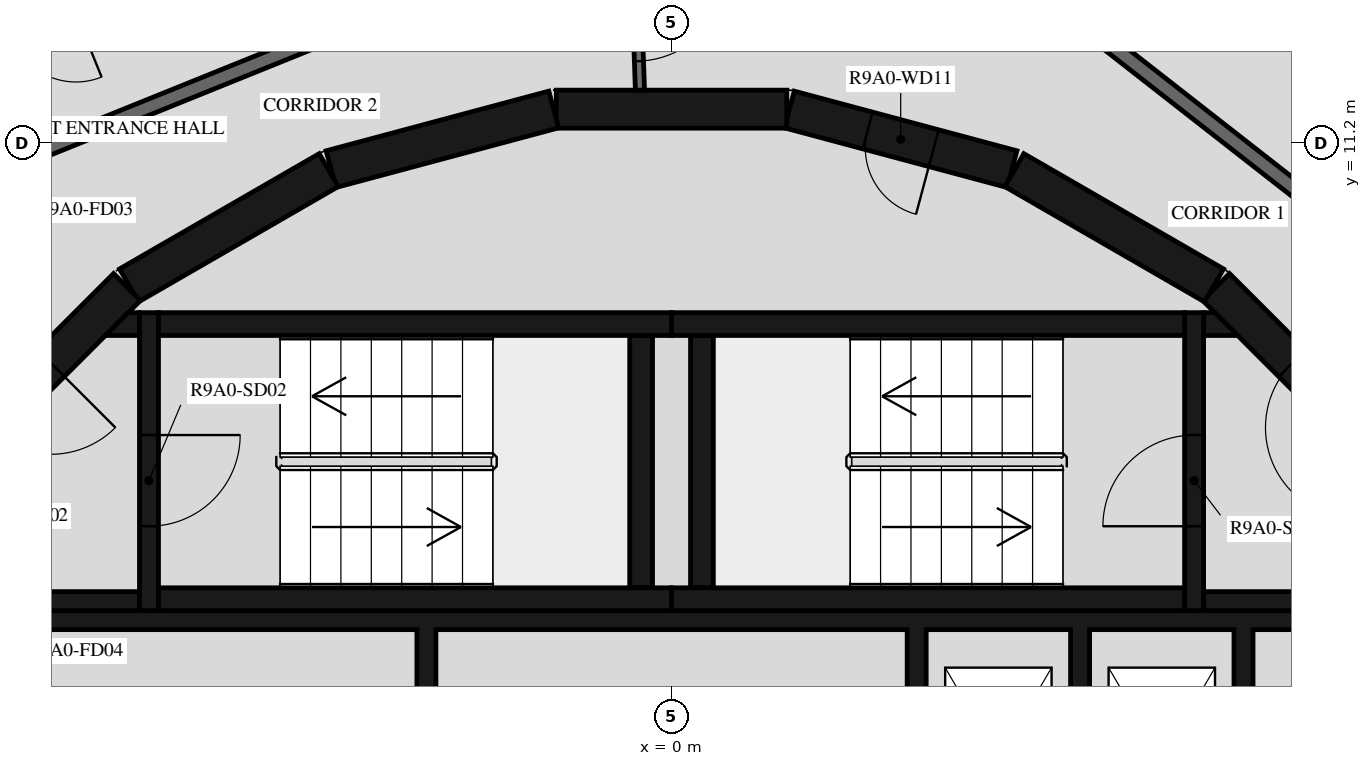
"""IFC4 building model, lengths in metres.
Left out: names, types, materials, properties, quantities, classifications, styles, units other than length and angle.
Written with IfcOpenShell. Run it as: python <this file> out.ifc"""

import sys

from ifc_helpers import new_model, si_unit, direction, frame, frame_2d, origin, place, context, subcontext, project, spatial, polyline, rectangle, outline, extrude, element, fill, save


model = new_model("IFC4")
c1 = context("Model", 3, precision=1e-05, world=origin(), true_north=direction((0.0, 1.0)))
c2 = subcontext(c1, "Body", "Model", "MODEL_VIEW")
j1 = project(units=[si_unit("LENGTHUNIT", "METRE"), si_unit("PLANEANGLEUNIT", "RADIAN")], contexts=[c1])
p1 = place(None, origin())
s1 = spatial("IfcSite", under=j1, at=p1, CompositionType="ELEMENT")
p2 = place(p1, origin())
s2 = spatial("IfcBuilding", under=s1, at=p2, CompositionType="ELEMENT")
p3 = place(p2, frame((0.0, 0.0, 333.0)))
s3 = spatial("IfcBuildingStorey", under=s2, at=p3, CompositionType="ELEMENT", Elevation=333.0)
p4 = place(p3, frame((9.308, 7.164, 0.0), z_axis=(0.0, 0.0, 1.0), x_axis=(-0.707106781187, 0.707106781187, 0.0)))
e1 = element("IfcWall", 1, at=p4, inside=s3, PredefinedType="SHEAR", context=c2, shape_type="SweptSolid", body=[
    extrude(rectangle(XDim=3.032, YDim=0.5, at=frame_2d((1.516, 0.0))), origin(), (0.0, 0.0, 1.0), 3.12),
])
p5 = place(p4, frame((0.416, 0.0, 0.0)))
e2 = element("IfcOpeningElement", 2, at=p5, cuts=e1, PredefinedType="OPENING", context=c2, shape_type="SweptSolid", body=[
    extrude(rectangle(XDim=1.2, YDim=2.1, at=frame_2d((0.6, 1.05))), frame((0.0, 0.26, 0.0), z_axis=(0.0, -1.0, 0.0), x_axis=(1.0, 0.0, 0.0)), (0.0, 0.0, 1.0), 0.52),
])
p6 = place(p3, frame((7.137, 9.329, 0.0), z_axis=(0.0, 0.0, 1.0), x_axis=(-0.865975092491, 0.500087131594, 0.0)))
e3 = element("IfcWall", 3, at=p6, inside=s3, PredefinedType="SHEAR", context=c2, shape_type="SweptSolid", body=[
    extrude(rectangle(XDim=3.033, YDim=0.5, at=frame_2d((1.516, 0.0))), origin(), (0.0, 0.0, 1.0), 3.12),
])
p7 = place(p3, frame((4.479, 10.858, 0.0), z_axis=(0.0, 0.0, 1.0), x_axis=(-0.965948410781, 0.258734743916, 0.0)))
e4 = element("IfcWall", 4, at=p7, inside=s3, PredefinedType="SHEAR", context=c2, shape_type="SweptSolid", body=[
    extrude(rectangle(XDim=3.033, YDim=0.5, at=frame_2d((1.516, 0.0))), origin(), (0.0, 0.0, 1.0), 3.12),
])
p8 = place(p7, frame((1.066, 0.0, 0.0)))
e5 = element("IfcOpeningElement", 5, at=p8, cuts=e4, PredefinedType="OPENING", context=c2, shape_type="SweptSolid", body=[
    extrude(rectangle(XDim=0.9, YDim=2.1, at=frame_2d((0.45, 1.05))), frame((0.0, 0.26, 0.0), z_axis=(0.0, -1.0, 0.0), x_axis=(1.0, 0.0, 0.0)), (0.0, 0.0, 1.0), 0.52),
])
for number, where, z_axis, x_axis in (
    (6, (1.516, 11.647, 0.0), (0.0, 0.0, 1.0), (-1.0, 0.0, 0.0)),
    (7, (-1.55, 11.643, 0.0), (0.0, 0.0, 1.0), (-0.966, -0.259, 0.0)),
    (8, (-4.51, 10.845, 0.0), (0.0, 0.0, 1.0), (-0.866, -0.5, 0.0)),
):
    element("IfcWall", number, at=place(p3, frame(where, z_axis=z_axis, x_axis=x_axis)), inside=s3, PredefinedType="SHEAR", context=c2, shape_type="SweptSolid", body=[
        extrude(rectangle(XDim=3.033, YDim=0.5, at=frame_2d((1.516, 0.0))), origin(), (0.0, 0.0, 1.0), 3.12),
    ])
p9 = place(p3, frame((-7.164, 9.308, 0.0), z_axis=(0.0, 0.0, 1.0), x_axis=(-0.707106781187, -0.707106781187, 0.0)))
e9 = element("IfcWall", 9, at=p9, inside=s3, PredefinedType="SHEAR", context=c2, shape_type="SweptSolid", body=[
    extrude(rectangle(XDim=3.032, YDim=0.5, at=frame_2d((1.516, 0.0))), origin(), (0.0, 0.0, 1.0), 3.12),
])
p10 = place(p9, frame((1.416, 0.0, 0.0)))
e10 = element("IfcOpeningElement", 10, at=p10, cuts=e9, PredefinedType="OPENING", context=c2, shape_type="SweptSolid", body=[
    extrude(rectangle(XDim=1.2, YDim=2.1, at=frame_2d((0.6, 1.05))), frame((0.0, 0.26, 0.0), z_axis=(0.0, -1.0, 0.0), x_axis=(1.0, 0.0, 0.0)), (0.0, 0.0, 1.0), 0.52),
])
for number, where, z_axis, x_axis in (
    (11, (0.0, 5.2, 0.0), (0.0, 0.0, 1.0), (1.0, 0.0, 0.0)),
    (12, (0.0, 8.82, 0.0), (0.0, 0.0, 1.0), (1.0, 0.0, 0.0)),
):
    element("IfcWall", number, at=place(p3, frame(where, z_axis=z_axis, x_axis=x_axis)), inside=s3, PredefinedType="SHEAR", context=c2, shape_type="SweptSolid", body=[
        extrude(rectangle(XDim=6.75, YDim=0.3, at=frame_2d((3.375, 0.0))), origin(), (0.0, 0.0, 1.0), 3.12),
    ])
p11 = place(p3, frame((0.4, 5.35, 0.0), z_axis=(0.0, 0.0, 1.0), x_axis=(0.0, 1.0, 0.0)))
e13 = element("IfcWall", 13, at=p11, inside=s3, PredefinedType="SHEAR", context=c2, shape_type="SweptSolid", body=[
    extrude(rectangle(XDim=3.32, YDim=0.3, at=frame_2d((1.66, 0.0))), origin(), (0.0, 0.0, 1.0), 3.12),
])
p12 = place(p3, frame((6.875, 5.05, 0.0), z_axis=(0.0, 0.0, 1.0), x_axis=(0.0, 1.0, 0.0)))
e14 = element("IfcWall", 14, at=p12, inside=s3, PredefinedType="SHEAR", context=c2, shape_type="SweptSolid", body=[
    extrude(rectangle(XDim=3.92, YDim=0.25, at=frame_2d((1.96, 0.0))), origin(), (0.0, 0.0, 1.0), 3.12),
])
p13 = place(p12, frame((1.11, 0.0, 0.0)))
e15 = element("IfcOpeningElement", 15, at=p13, cuts=e14, PredefinedType="OPENING", context=c2, shape_type="SweptSolid", body=[
    extrude(rectangle(XDim=1.2, YDim=2.1, at=frame_2d((0.6, 1.05))), frame((0.0, 0.135, 0.0), z_axis=(0.0, -1.0, 0.0), x_axis=(1.0, 0.0, 0.0)), (0.0, 0.0, 1.0), 0.27),
])
p14 = place(p3, frame((7.0, 5.175, 0.0), z_axis=(0.0, 0.0, 1.0), x_axis=(1.0, 0.0, 0.0)))
e16 = element("IfcWall", 16, at=p14, inside=s3, PredefinedType="SHEAR", context=c2, shape_type="SweptSolid", body=[
    extrude(rectangle(XDim=3.1, YDim=0.25, at=frame_2d((1.55, 0.0))), origin(), (0.0, 0.0, 1.0), 3.12),
])
p15 = place(p3, origin())
e17 = element("IfcWall", 17, at=p15, inside=s3, PredefinedType="SHEAR", context=c2, shape_type="SweptSolid", body=[
    extrude(outline(polyline([(7.448, 8.67), (7.0, 8.67), (7.0, 8.97), (7.148, 8.97), (7.448, 8.67)])), origin(), (0.0, 0.0, 1.0), 3.12),
])
for number, where, z_axis, x_axis in (
    (18, (-6.75, 5.2, 0.0), (0.0, 0.0, 1.0), (1.0, 0.0, 0.0)),
    (19, (-6.75, 8.82, 0.0), (0.0, 0.0, 1.0), (1.0, 0.0, 0.0)),
):
    element("IfcWall", number, at=place(p3, frame(where, z_axis=z_axis, x_axis=x_axis)), inside=s3, PredefinedType="SHEAR", context=c2, shape_type="SweptSolid", body=[
        extrude(rectangle(XDim=6.75, YDim=0.3, at=frame_2d((3.375, 0.0))), origin(), (0.0, 0.0, 1.0), 3.12),
    ])
p16 = place(p3, frame((-0.4, 5.35, 0.0), z_axis=(0.0, 0.0, 1.0), x_axis=(0.0, 1.0, 0.0)))
e20 = element("IfcWall", 20, at=p16, inside=s3, PredefinedType="SHEAR", context=c2, shape_type="SweptSolid", body=[
    extrude(rectangle(XDim=3.32, YDim=0.3, at=frame_2d((1.66, 0.0))), origin(), (0.0, 0.0, 1.0), 3.12),
])
p17 = place(p3, frame((-6.875, 8.97, 0.0), z_axis=(0.0, 0.0, 1.0), x_axis=(0.0, -1.0, 0.0)))
e21 = element("IfcWall", 21, at=p17, inside=s3, PredefinedType="SHEAR", context=c2, shape_type="SweptSolid", body=[
    extrude(rectangle(XDim=3.92, YDim=0.25, at=frame_2d((1.96, 0.0))), origin(), (0.0, 0.0, 1.0), 3.12),
])
p18 = place(p17, frame((1.61, 0.0, 0.0)))
e22 = element("IfcOpeningElement", 22, at=p18, cuts=e21, PredefinedType="OPENING", context=c2, shape_type="SweptSolid", body=[
    extrude(rectangle(XDim=1.2, YDim=2.1, at=frame_2d((0.6, 1.05))), frame((0.0, 0.135, 0.0), z_axis=(0.0, -1.0, 0.0), x_axis=(1.0, 0.0, 0.0)), (0.0, 0.0, 1.0), 0.27),
])
p19 = place(p3, frame((-7.0, 5.175, 0.0), z_axis=(0.0, 0.0, 1.0), x_axis=(-1.0, 0.0, 0.0)))
e23 = element("IfcWall", 23, at=p19, inside=s3, PredefinedType="SHEAR", context=c2, shape_type="SweptSolid", body=[
    extrude(rectangle(XDim=3.1, YDim=0.25, at=frame_2d((1.55, 0.0))), origin(), (0.0, 0.0, 1.0), 3.12),
])
p20 = place(p3, origin())
e24 = element("IfcWall", 24, at=p20, inside=s3, PredefinedType="SHEAR", context=c2, shape_type="SweptSolid", body=[
    extrude(outline(polyline([(-7.148, 8.97), (-7.0, 8.97), (-7.0, 8.67), (-7.448, 8.67), (-7.148, 8.97)])), origin(), (0.0, 0.0, 1.0), 3.12),
])
p21 = place(p3, origin())
e25 = element("IfcWall", 25, at=p21, inside=s3, PredefinedType="SHEAR", context=c2, shape_type="SweptSolid", body=[
    extrude(outline(polyline([(-9.8, 1.9), (-9.55, 1.9), (-9.55, 4.8), (-3.35, 4.8), (-3.35, 1.9), (-3.1, 1.9), (-3.1, 4.8), (3.1, 4.8), (3.1, 1.9), (3.35, 1.9), (3.35, 4.8), (5.25, 4.8), (5.25, 1.9), (5.5, 1.9), (5.5, 4.8), (7.4, 4.8), (7.4, 1.9), (7.65, 1.9), (7.65, 4.8), (9.55, 4.8), (9.55, 1.9), (9.8, 1.9), (9.8, 4.8), (9.8, 5.05), (-9.8, 5.05), (-9.8, 4.8), (-9.8, 1.9)])), origin(), (0.0, 0.0, 1.0), 3.12),
])
p22 = place(p3, frame((-0.475, 13.598, 0.0), z_axis=(0.0, 0.0, 1.0), x_axis=(0.034852521429, -0.999392466326, 0.0)))
e26 = element("IfcWall", 26, at=p22, inside=s3, PredefinedType="PARTITIONING", context=c2, shape_type="SweptSolid", body=[
    extrude(rectangle(XDim=1.702, YDim=0.12, at=frame_2d((0.851, 0.0))), origin(), (0.0, 0.0, 1.0), 3.12),
])
p23 = place(p22, frame((0.12, 0.0, 0.0)))
e27 = element("IfcOpeningElement", 27, at=p23, cuts=e26, PredefinedType="OPENING", context=c2, shape_type="SweptSolid", body=[
    extrude(rectangle(XDim=1.2, YDim=2.1, at=frame_2d((0.6, 1.05))), frame((0.0, 0.07, 0.0), z_axis=(0.0, -1.0, 0.0), x_axis=(1.0, 0.0, 0.0)), (0.0, 0.0, 1.0), 0.14),
])
p24 = place(p3, frame((11.079, 8.349, 0.0), z_axis=(0.0, 0.0, 1.0), x_axis=(-0.78800478687, 0.615669112324, 0.0)))
e28 = element("IfcWall", 28, at=p24, inside=s3, PredefinedType="STANDARD", context=c2, shape_type="SweptSolid", body=[
    extrude(rectangle(XDim=7.181, YDim=0.2, at=frame_2d((3.591, 0.0))), origin(), (0.0, 0.0, 1.0), 3.12),
])
p25 = place(p24, frame((1.0, 0.0, 0.0)))
e29 = element("IfcOpeningElement", 29, at=p25, cuts=e28, PredefinedType="OPENING", context=c2, shape_type="SweptSolid", body=[
    extrude(rectangle(XDim=1.0, YDim=2.1, at=frame_2d((0.5, 1.05))), frame((0.0, 0.11, 0.0), z_axis=(0.0, -1.0, 0.0), x_axis=(1.0, 0.0, 0.0)), (0.0, 0.0, 1.0), 0.22),
])
p26 = place(p3, frame((-1.691, 13.769, 0.0), z_axis=(0.0, 0.0, 1.0), x_axis=(-0.92717916932, -0.374618189599, 0.0)))
e30 = element("IfcWall", 30, at=p26, inside=s3, PredefinedType="STANDARD", context=c2, shape_type="SweptSolid", body=[
    extrude(rectangle(XDim=7.181, YDim=0.2, at=frame_2d((3.591, 0.0))), origin(), (0.0, 0.0, 1.0), 3.12),
])
p27 = place(p3, frame((12.319, 9.283, 0.0), z_axis=(0.0, 0.0, 1.0), x_axis=(-0.788000268464, 0.61567489546, 0.0)))
e31 = element("IfcWall", 31, at=p27, inside=s3, PredefinedType="PARTITIONING", context=c2, shape_type="SweptSolid", body=[
    extrude(rectangle(XDim=7.985, YDim=0.12, at=frame_2d((3.992, 0.0))), origin(), (0.0, 0.0, 1.0), 3.12),
])
p28 = place(p27, frame((0.2, 0.0, 0.0)))
e32 = element("IfcOpeningElement", 32, at=p28, cuts=e31, PredefinedType="OPENING", context=c2, shape_type="SweptSolid", body=[
    extrude(rectangle(XDim=0.9, YDim=2.1, at=frame_2d((0.45, 1.05))), frame((0.0, 0.07, 0.0), z_axis=(0.0, -1.0, 0.0), x_axis=(1.0, 0.0, 0.0)), (0.0, 0.0, 1.0), 0.14),
])
p29 = place(p3, frame((-1.88, 15.311, 0.0), z_axis=(0.0, 0.0, 1.0), x_axis=(-0.927184866592, -0.374604088557, 0.0)))
e33 = element("IfcWall", 33, at=p29, inside=s3, PredefinedType="PARTITIONING", context=c2, shape_type="SweptSolid", body=[
    extrude(rectangle(XDim=7.985, YDim=0.12, at=frame_2d((3.993, 0.0))), origin(), (0.0, 0.0, 1.0), 3.12),
])
p30 = place(p29, frame((3.262, 0.0, 0.0)))
e34 = element("IfcOpeningElement", 34, at=p30, cuts=e33, PredefinedType="OPENING", context=c2, shape_type="SweptSolid", body=[
    extrude(rectangle(XDim=0.9, YDim=2.1, at=frame_2d((0.45, 1.05))), frame((0.0, 0.07, 0.0), z_axis=(0.0, -1.0, 0.0), x_axis=(1.0, 0.0, 0.0)), (0.0, 0.0, 1.0), 0.14),
])
p31 = place(p29, frame((6.423, 0.0, 0.0)))
e35 = element("IfcOpeningElement", 35, at=p31, cuts=e33, PredefinedType="OPENING", context=c2, shape_type="SweptSolid", body=[
    extrude(rectangle(XDim=0.9, YDim=2.1, at=frame_2d((0.45, 1.05))), frame((0.0, 0.07, 0.0), z_axis=(0.0, -1.0, 0.0), x_axis=(1.0, 0.0, 0.0)), (0.0, 0.0, 1.0), 0.14),
])
p32 = place(p13, origin())
e36 = element("IfcDoor", 36, at=p32, inside=s3, OperationType="SINGLE_SWING_LEFT", PredefinedType="DOOR", context=c2, shape_type="SweptSolid", body=[
    extrude(rectangle(XDim=1.2, YDim=2.1, at=frame_2d((0.6, 1.05))), frame((0.0, 0.025, 0.0), z_axis=(0.0, -1.0, 0.0), x_axis=(1.0, 0.0, 0.0)), (0.0, 0.0, 1.0), 0.05),
])
fill(e15, e36)
p33 = place(p5, origin())
e37 = element("IfcDoor", 37, at=p33, inside=s3, OperationType="SINGLE_SWING_RIGHT", PredefinedType="DOOR", context=c2, shape_type="SweptSolid", body=[
    extrude(rectangle(XDim=1.2, YDim=2.1, at=frame_2d((0.6, 1.05))), frame((0.0, 0.025, 0.0), z_axis=(0.0, -1.0, 0.0), x_axis=(1.0, 0.0, 0.0)), (0.0, 0.0, 1.0), 0.05),
])
fill(e2, e37)
p34 = place(p18, origin())
e38 = element("IfcDoor", 38, at=p34, inside=s3, OperationType="SINGLE_SWING_LEFT", PredefinedType="DOOR", context=c2, shape_type="SweptSolid", body=[
    extrude(rectangle(XDim=1.2, YDim=2.1, at=frame_2d((0.6, 1.05))), frame((0.0, 0.025, 0.0), z_axis=(0.0, -1.0, 0.0), x_axis=(1.0, 0.0, 0.0)), (0.0, 0.0, 1.0), 0.05),
])
fill(e22, e38)
p35 = place(p10, origin())
e39 = element("IfcDoor", 39, at=p35, inside=s3, OperationType="SINGLE_SWING_RIGHT", PredefinedType="DOOR", context=c2, shape_type="SweptSolid", body=[
    extrude(rectangle(XDim=1.2, YDim=2.1, at=frame_2d((0.6, 1.05))), frame((0.0, 0.025, 0.0), z_axis=(0.0, -1.0, 0.0), x_axis=(1.0, 0.0, 0.0)), (0.0, 0.0, 1.0), 0.05),
])
fill(e10, e39)
p36 = place(p8, origin())
e40 = element("IfcDoor", 40, at=p36, inside=s3, OperationType="SINGLE_SWING_LEFT", PredefinedType="DOOR", context=c2, shape_type="SweptSolid", body=[
    extrude(rectangle(XDim=0.9, YDim=2.1, at=frame_2d((0.45, 1.05))), frame((0.0, 0.025, 0.0), z_axis=(0.0, -1.0, 0.0), x_axis=(1.0, 0.0, 0.0)), (0.0, 0.0, 1.0), 0.05),
])
fill(e5, e40)
p37 = place(p23, origin())
e41 = element("IfcDoor", 41, at=p37, inside=s3, OperationType="DOUBLE_DOOR_SINGLE_SWING", PredefinedType="DOOR", context=c2, shape_type="SweptSolid", body=[
    extrude(rectangle(XDim=1.2, YDim=2.1, at=frame_2d((0.6, 1.05))), frame((0.0, 0.025, 0.0), z_axis=(0.0, -1.0, 0.0), x_axis=(1.0, 0.0, 0.0)), (0.0, 0.0, 1.0), 0.05),
])
fill(e27, e41)
save(model, sys.argv[1])
